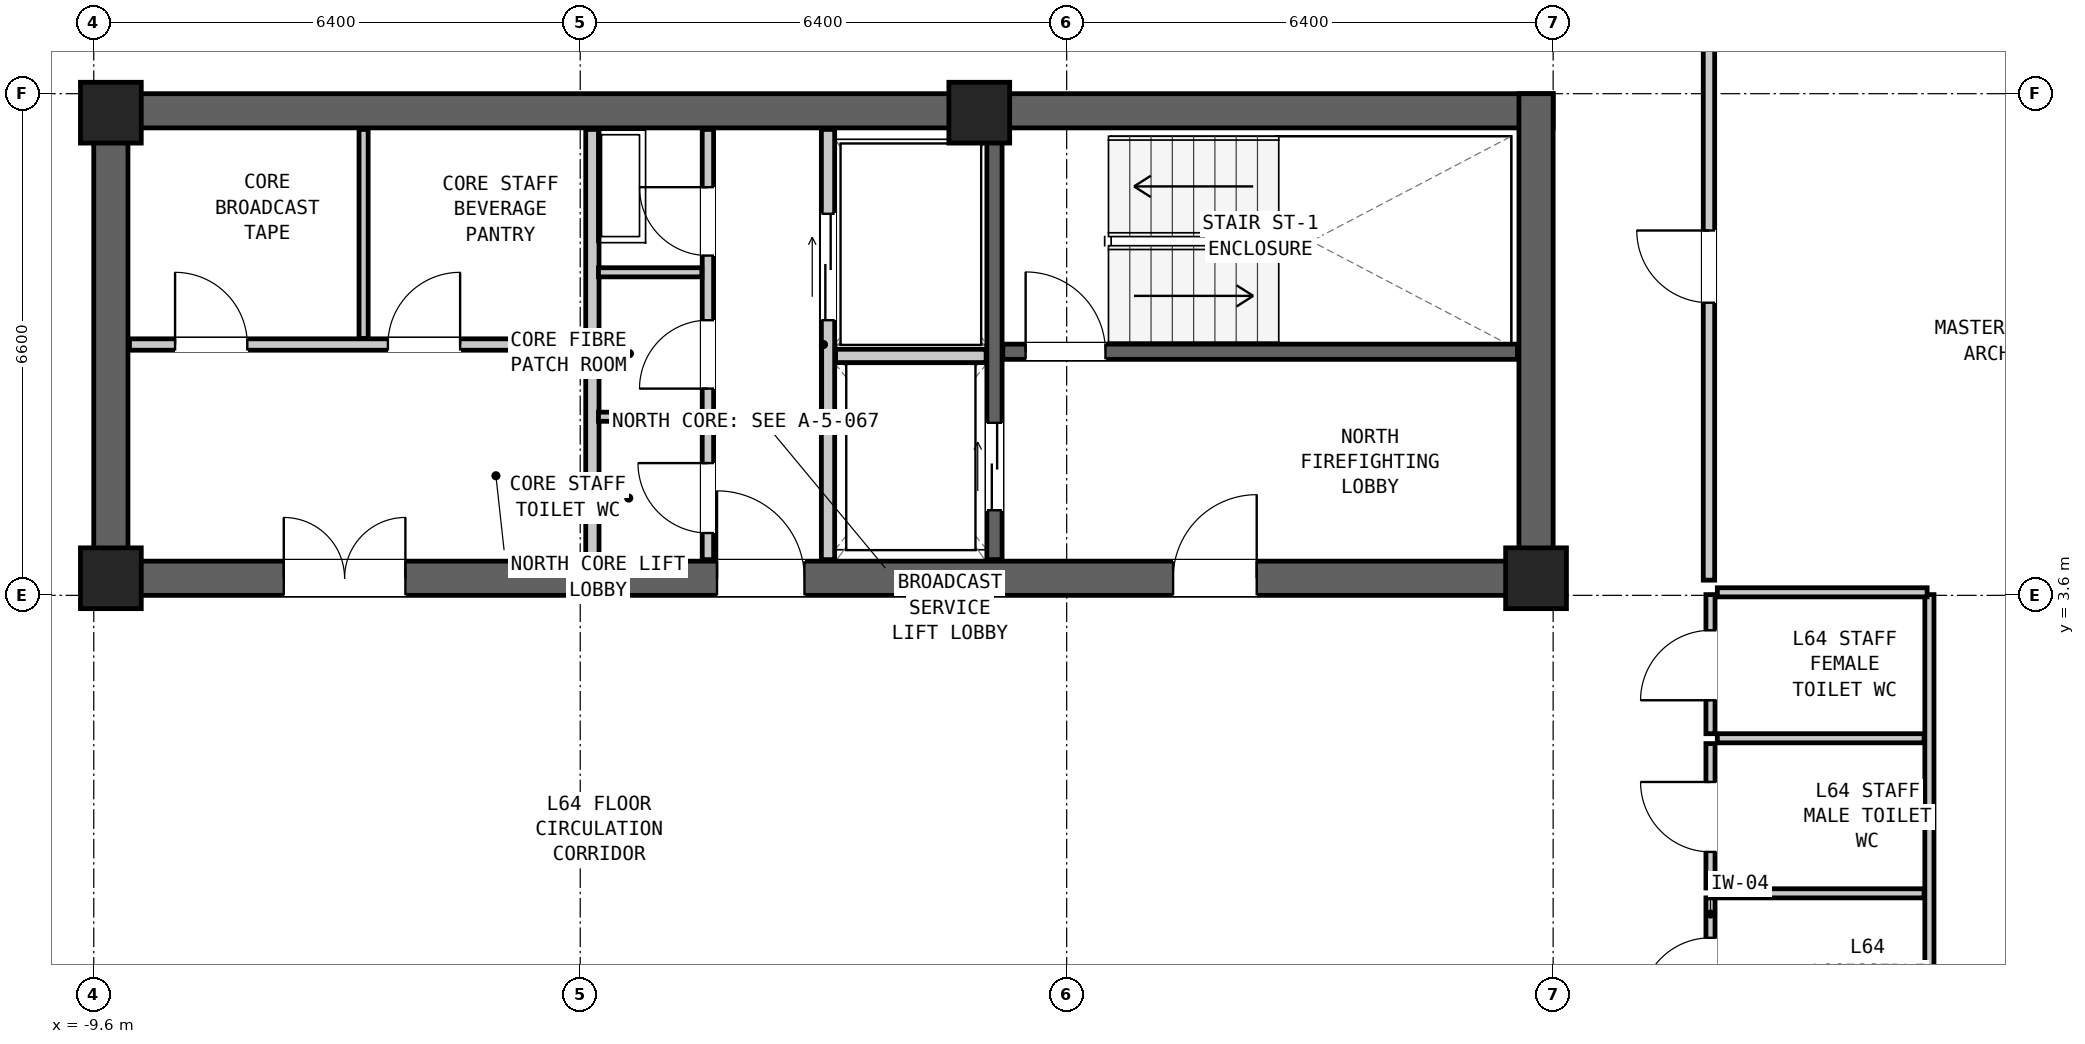
"""IFC4 building model, lengths in metres.
Left out: names, types, materials, properties, quantities, classifications, styles, units other than length and angle.
Written with IfcOpenShell. Run it as: python <this file> out.ifc"""

import sys

from ifc_helpers import new_model, si_unit, direction, frame, frame_2d, origin, origin_2d, place, context, subcontext, project, spatial, rectangle, extrude, element, fill, save


model = new_model("IFC4")
c1 = context("Model", 3, precision=1e-05, world=origin(), true_north=direction((0.0, 1.0)))
c2 = subcontext(c1, "Body", "Model", "MODEL_VIEW")
j1 = project(units=[si_unit("LENGTHUNIT", "METRE"), si_unit("PLANEANGLEUNIT", "RADIAN")], contexts=[c1])
p1 = place(None, origin())
s1 = spatial("IfcSite", under=j1, at=p1, CompositionType="ELEMENT")
p2 = place(p1, origin())
s2 = spatial("IfcBuilding", under=s1, at=p2, CompositionType="ELEMENT")
p3 = place(p2, frame((0.0, 0.0, 217.8)))
s3 = spatial("IfcBuildingStorey", under=s2, at=p3, CompositionType="ELEMENT", Elevation=217.8)
p4 = place(p3, frame((-9.6, 9.975, 0.0), z_axis=(0.0, 0.0, 1.0), x_axis=(1.0, 0.0, 0.0)))
e1 = element("IfcWall", 1, at=p4, inside=s3, PredefinedType="SHEAR", context=c2, shape_type="SweptSolid", body=[
    extrude(rectangle(XDim=19.2, YDim=0.45, at=frame_2d((9.6, 0.0))), origin(), (0.0, 0.0, 1.0), 3.05),
])
p5 = place(p3, frame((-9.6, 3.825, 0.0), z_axis=(0.0, 0.0, 1.0), x_axis=(1.0, 0.0, 0.0)))
e2 = element("IfcWall", 2, at=p5, inside=s3, PredefinedType="SHEAR", context=c2, shape_type="SweptSolid", body=[
    extrude(rectangle(XDim=19.2, YDim=0.45, at=frame_2d((9.6, 0.0))), origin(), (0.0, 0.0, 1.0), 3.05),
])
p6 = place(p5, frame((14.2, 0.0, 0.0)))
e3 = element("IfcOpeningElement", 3, at=p6, cuts=e2, PredefinedType="OPENING", context=c2, shape_type="SweptSolid", body=[
    extrude(rectangle(XDim=1.1, YDim=2.08, at=frame_2d((0.55, 1.04))), frame((0.0, 0.237, 0.0), z_axis=(0.0, -1.0, 0.0), x_axis=(1.0, 0.0, 0.0)), (0.0, 0.0, 1.0), 0.474),
])
p7 = place(p5, frame((8.2, 0.0, 0.0)))
e4 = element("IfcOpeningElement", 4, at=p7, cuts=e2, PredefinedType="OPENING", context=c2, shape_type="SweptSolid", body=[
    extrude(rectangle(XDim=1.15, YDim=2.1, at=frame_2d((0.575, 1.05))), frame((0.0, 0.237, 0.0), z_axis=(0.0, -1.0, 0.0), x_axis=(1.0, 0.0, 0.0)), (0.0, 0.0, 1.0), 0.474),
])
p8 = place(p5, frame((2.5, 0.0, 0.0)))
e5 = element("IfcOpeningElement", 5, at=p8, cuts=e2, PredefinedType="OPENING", context=c2, shape_type="SweptSolid", body=[
    extrude(rectangle(XDim=1.6, YDim=2.12, at=frame_2d((0.8, 1.06))), frame((0.0, 0.237, 0.0), z_axis=(0.0, -1.0, 0.0), x_axis=(1.0, 0.0, 0.0)), (0.0, 0.0, 1.0), 0.474),
])
for number, where, z_axis, x_axis in (
    (6, (-9.375, 3.6, 0.0), (0.0, 0.0, 1.0), (0.0, 1.0, 0.0)),
    (7, (9.375, 3.6, 0.0), (0.0, 0.0, 1.0), (0.0, 1.0, 0.0)),
):
    element("IfcWall", number, at=place(p3, frame(where, z_axis=z_axis, x_axis=x_axis)), inside=s3, PredefinedType="SHEAR", context=c2, shape_type="SweptSolid", body=[
        extrude(rectangle(XDim=6.6, YDim=0.45, at=frame_2d((3.3, 0.0))), origin(), (0.0, 0.0, 1.0), 3.05),
    ])
for number, where, z_axis, x_axis in (
    (8, (-9.375, 9.95, 0.0), (0.0, 0.0, 1.0), (1.0, 0.0, 0.0)),
    (9, (2.05, 9.95, 0.0), (0.0, 0.0, 1.0), (1.0, 0.0, 0.0)),
    (10, (-9.375, 3.825, 0.0), (0.0, 0.0, 1.0), (1.0, 0.0, 0.0)),
    (11, (9.375, 3.825, 0.0), (0.0, 0.0, 1.0), (1.0, 0.0, 0.0)),
):
    element("IfcColumn", number, at=place(p3, frame(where, z_axis=z_axis, x_axis=x_axis)), inside=s3, PredefinedType="COLUMN", context=c2, shape_type="SweptSolid", body=[
        extrude(rectangle(XDim=0.8, YDim=0.8, at=origin_2d()), origin(), (0.0, 0.0, 1.0), 3.05),
    ])
p9 = place(p3, frame((2.36, 6.805, 0.0), z_axis=(0.0, 0.0, 1.0), x_axis=(1.0, 0.0, 0.0)))
e12 = element("IfcWall", 12, at=p9, inside=s3, PredefinedType="SHEAR", context=c2, shape_type="SweptSolid", body=[
    extrude(rectangle(XDim=6.77, YDim=0.2, at=frame_2d((3.385, 0.0))), origin(), (0.0, 0.0, 1.0), 2.86),
])
p10 = place(p9, frame((0.3, 0.0, 0.0)))
e13 = element("IfcOpeningElement", 13, at=p10, cuts=e12, PredefinedType="OPENING", context=c2, shape_type="SweptSolid", body=[
    extrude(rectangle(XDim=1.05, YDim=2.08, at=frame_2d((0.525, 1.04))), frame((0.0, 0.112, 0.0), z_axis=(0.0, -1.0, 0.0), x_axis=(1.0, 0.0, 0.0)), (0.0, 0.0, 1.0), 0.224),
])
p11 = place(p3, frame((2.25, 4.07, 0.0), z_axis=(0.0, 0.0, 1.0), x_axis=(0.0, 1.0, 0.0)))
e14 = element("IfcWall", 14, at=p11, inside=s3, PredefinedType="SHEAR", context=c2, shape_type="SweptSolid", body=[
    extrude(rectangle(XDim=5.66, YDim=0.2, at=frame_2d((2.83, 0.0))), origin(), (0.0, 0.0, 1.0), 2.86),
])
p12 = place(p11, frame((0.65, 0.0, 0.0)))
e15 = element("IfcOpeningElement", 15, at=p12, cuts=e14, PredefinedType="OPENING", context=c2, shape_type="SweptSolid", body=[
    extrude(rectangle(XDim=1.15, YDim=2.08, at=frame_2d((0.575, 1.04))), frame((0.0, 0.112, 0.0), z_axis=(0.0, -1.0, 0.0), x_axis=(1.0, 0.0, 0.0)), (0.0, 0.0, 1.0), 0.224),
])
p13 = place(p3, frame((0.06, 4.07, 0.0), z_axis=(0.0, 0.0, 1.0), x_axis=(0.0, 1.0, 0.0)))
e16 = element("IfcWall", 16, at=p13, inside=s3, PredefinedType="PARTITIONING", context=c2, shape_type="SweptSolid", body=[
    extrude(rectangle(XDim=5.66, YDim=0.175, at=frame_2d((2.83, 0.0))), origin(), (0.0, 0.0, 1.0), 2.86),
])
p14 = place(p13, frame((3.15, 0.0, 0.0)))
e17 = element("IfcOpeningElement", 17, at=p14, cuts=e16, PredefinedType="OPENING", context=c2, shape_type="SweptSolid", body=[
    extrude(rectangle(XDim=1.4, YDim=2.12, at=frame_2d((0.7, 1.06))), frame((0.0, 0.1, 0.0), z_axis=(0.0, -1.0, 0.0), x_axis=(1.0, 0.0, 0.0)), (0.0, 0.0, 1.0), 0.199),
])
p15 = place(p3, frame((0.16, 6.75, 0.0), z_axis=(0.0, 0.0, 1.0), x_axis=(1.0, 0.0, 0.0)))
e18 = element("IfcWall", 18, at=p15, inside=s3, PredefinedType="PARTITIONING", context=c2, shape_type="SweptSolid", body=[
    extrude(rectangle(XDim=1.98, YDim=0.175, at=frame_2d((0.99, 0.0))), origin(), (0.0, 0.0, 1.0), 2.86),
])
p16 = place(p3, frame((-3.04, 4.07, 0.0), z_axis=(0.0, 0.0, 1.0), x_axis=(0.0, 1.0, 0.0)))
e19 = element("IfcWall", 19, at=p16, inside=s3, PredefinedType="PARTITIONING", context=c2, shape_type="SweptSolid", body=[
    extrude(rectangle(XDim=5.66, YDim=0.175, at=frame_2d((2.83, 0.0))), origin(), (0.0, 0.0, 1.0), 2.86),
])
p17 = place(p3, frame((-1.52, 4.07, 0.0), z_axis=(0.0, 0.0, 1.0), x_axis=(0.0, 1.0, 0.0)))
e20 = element("IfcWall", 20, at=p17, inside=s3, PredefinedType="PARTITIONING", context=c2, shape_type="SweptSolid", body=[
    extrude(rectangle(XDim=5.66, YDim=0.15, at=frame_2d((2.83, 0.0))), origin(), (0.0, 0.0, 1.0), 2.86),
])
p18 = place(p17, frame((4.0, 0.0, 0.0)))
e21 = element("IfcOpeningElement", 21, at=p18, cuts=e20, PredefinedType="OPENING", context=c2, shape_type="SweptSolid", body=[
    extrude(rectangle(XDim=0.9, YDim=2.05, at=frame_2d((0.45, 1.025))), frame((0.0, 0.087, 0.0), z_axis=(0.0, -1.0, 0.0), x_axis=(1.0, 0.0, 0.0)), (0.0, 0.0, 1.0), 0.174),
])
p19 = place(p17, frame((2.25, 0.0, 0.0)))
e22 = element("IfcOpeningElement", 22, at=p19, cuts=e20, PredefinedType="OPENING", context=c2, shape_type="SweptSolid", body=[
    extrude(rectangle(XDim=0.9, YDim=2.05, at=frame_2d((0.45, 1.025))), frame((0.0, 0.087, 0.0), z_axis=(0.0, -1.0, 0.0), x_axis=(1.0, 0.0, 0.0)), (0.0, 0.0, 1.0), 0.174),
])
p20 = place(p17, frame((0.35, 0.0, 0.0)))
e23 = element("IfcOpeningElement", 23, at=p20, cuts=e20, PredefinedType="OPENING", context=c2, shape_type="SweptSolid", body=[
    extrude(rectangle(XDim=0.92, YDim=2.1, at=frame_2d((0.46, 1.05))), frame((0.0, 0.087, 0.0), z_axis=(0.0, -1.0, 0.0), x_axis=(1.0, 0.0, 0.0)), (0.0, 0.0, 1.0), 0.174),
])
for number, where, z_axis, x_axis in (
    (24, (-2.96, 5.95, 0.0), (0.0, 0.0, 1.0), (1.0, 0.0, 0.0)),
    (25, (-2.96, 7.85, 0.0), (0.0, 0.0, 1.0), (1.0, 0.0, 0.0)),
):
    element("IfcWall", number, at=place(p3, frame(where, z_axis=z_axis, x_axis=x_axis)), inside=s3, PredefinedType="PARTITIONING", context=c2, shape_type="SweptSolid", body=[
        extrude(rectangle(XDim=1.36, YDim=0.12, at=frame_2d((0.68, 0.0))), origin(), (0.0, 0.0, 1.0), 2.86),
    ])
p21 = place(p3, frame((-9.13, 6.9, 0.0), z_axis=(0.0, 0.0, 1.0), x_axis=(1.0, 0.0, 0.0)))
e26 = element("IfcWall", 26, at=p21, inside=s3, PredefinedType="PARTITIONING", context=c2, shape_type="SweptSolid", body=[
    extrude(rectangle(XDim=6.01, YDim=0.15, at=frame_2d((3.005, 0.0))), origin(), (0.0, 0.0, 1.0), 2.86),
])
p22 = place(p21, frame((0.6, 0.0, 0.0)))
e27 = element("IfcOpeningElement", 27, at=p22, cuts=e26, PredefinedType="OPENING", context=c2, shape_type="SweptSolid", body=[
    extrude(rectangle(XDim=0.95, YDim=2.1, at=frame_2d((0.475, 1.05))), frame((0.0, 0.087, 0.0), z_axis=(0.0, -1.0, 0.0), x_axis=(1.0, 0.0, 0.0)), (0.0, 0.0, 1.0), 0.174),
])
p23 = place(p21, frame((3.4, 0.0, 0.0)))
e28 = element("IfcOpeningElement", 28, at=p23, cuts=e26, PredefinedType="OPENING", context=c2, shape_type="SweptSolid", body=[
    extrude(rectangle(XDim=0.95, YDim=2.1, at=frame_2d((0.475, 1.05))), frame((0.0, 0.087, 0.0), z_axis=(0.0, -1.0, 0.0), x_axis=(1.0, 0.0, 0.0)), (0.0, 0.0, 1.0), 0.174),
])
p24 = place(p3, frame((-6.05, 6.98, 0.0), z_axis=(0.0, 0.0, 1.0), x_axis=(0.0, 1.0, 0.0)))
e29 = element("IfcWall", 29, at=p24, inside=s3, PredefinedType="PARTITIONING", context=c2, shape_type="SweptSolid", body=[
    extrude(rectangle(XDim=2.75, YDim=0.12, at=frame_2d((1.375, 0.0))), origin(), (0.0, 0.0, 1.0), 2.86),
])
p25 = place(p3, frame((11.67, -2.32, 0.0), z_axis=(0.0, 0.0, 1.0), x_axis=(0.0, 1.0, 0.0)))
e30 = element("IfcWall", 30, at=p25, inside=s3, PredefinedType="PARTITIONING", context=c2, shape_type="SweptSolid", body=[
    extrude(rectangle(XDim=1.94, YDim=0.12, at=frame_2d((0.97, 0.0))), origin(), (0.0, 0.0, 1.0), 2.86),
])
p26 = place(p25, frame((0.495, 0.0, 0.0)))
e31 = element("IfcOpeningElement", 31, at=p26, cuts=e30, PredefinedType="OPENING", context=c2, shape_type="SweptSolid", body=[
    extrude(rectangle(XDim=0.92, YDim=2.1, at=frame_2d((0.46, 1.05))), frame((0.0, 0.072, 0.0), z_axis=(0.0, -1.0, 0.0), x_axis=(1.0, 0.0, 0.0)), (0.0, 0.0, 1.0), 0.144),
])
p27 = place(p3, frame((11.67, -0.25, 0.0), z_axis=(0.0, 0.0, 1.0), x_axis=(0.0, 1.0, 0.0)))
e32 = element("IfcWall", 32, at=p27, inside=s3, PredefinedType="PARTITIONING", context=c2, shape_type="SweptSolid", body=[
    extrude(rectangle(XDim=1.9, YDim=0.12, at=frame_2d((0.95, 0.0))), origin(), (0.0, 0.0, 1.0), 2.86),
])
p28 = place(p27, frame((0.475, 0.0, 0.0)))
e33 = element("IfcOpeningElement", 33, at=p28, cuts=e32, PredefinedType="OPENING", context=c2, shape_type="SweptSolid", body=[
    extrude(rectangle(XDim=0.92, YDim=2.1, at=frame_2d((0.46, 1.05))), frame((0.0, 0.072, 0.0), z_axis=(0.0, -1.0, 0.0), x_axis=(1.0, 0.0, 0.0)), (0.0, 0.0, 1.0), 0.144),
])
p29 = place(p3, frame((11.67, 1.78, 0.0), z_axis=(0.0, 0.0, 1.0), x_axis=(0.0, 1.0, 0.0)))
e34 = element("IfcWall", 34, at=p29, inside=s3, PredefinedType="PARTITIONING", context=c2, shape_type="SweptSolid", body=[
    extrude(rectangle(XDim=1.83, YDim=0.12, at=frame_2d((0.915, 0.0))), origin(), (0.0, 0.0, 1.0), 2.86),
])
p30 = place(p29, frame((0.44, 0.0, 0.0)))
e35 = element("IfcOpeningElement", 35, at=p30, cuts=e34, PredefinedType="OPENING", context=c2, shape_type="SweptSolid", body=[
    extrude(rectangle(XDim=0.92, YDim=2.1, at=frame_2d((0.46, 1.05))), frame((0.0, 0.072, 0.0), z_axis=(0.0, -1.0, 0.0), x_axis=(1.0, 0.0, 0.0)), (0.0, 0.0, 1.0), 0.144),
])
p31 = place(p3, frame((14.55, -2.32, 0.0), z_axis=(0.0, 0.0, 1.0), x_axis=(0.0, 1.0, 0.0)))
e36 = element("IfcWall", 36, at=p31, inside=s3, PredefinedType="PARTITIONING", context=c2, shape_type="SweptSolid", body=[
    extrude(rectangle(XDim=5.93, YDim=0.12, at=frame_2d((2.965, 0.0))), origin(), (0.0, 0.0, 1.0), 2.86),
])
p32 = place(p3, frame((11.76, 3.64, 0.0), z_axis=(0.0, 0.0, 1.0), x_axis=(1.0, 0.0, 0.0)))
e37 = element("IfcWall", 37, at=p32, inside=s3, PredefinedType="PARTITIONING", context=c2, shape_type="SweptSolid", body=[
    extrude(rectangle(XDim=2.76, YDim=0.12, at=frame_2d((1.38, 0.0))), origin(), (0.0, 0.0, 1.0), 1.981),
])
for number, where, z_axis, x_axis in (
    (38, (11.76, -0.32, 0.0), (0.0, 0.0, 1.0), (1.0, 0.0, 0.0)),
    (39, (11.76, 1.72, 0.0), (0.0, 0.0, 1.0), (1.0, 0.0, 0.0)),
):
    element("IfcWall", number, at=place(p3, frame(where, z_axis=z_axis, x_axis=x_axis)), inside=s3, PredefinedType="PARTITIONING", context=c2, shape_type="SweptSolid", body=[
        extrude(rectangle(XDim=2.72, YDim=0.12, at=frame_2d((1.36, 0.0))), origin(), (0.0, 0.0, 1.0), 2.86),
    ])
p33 = place(p3, frame((11.65, 3.8, 0.0), z_axis=(0.0, 0.0, 1.0), x_axis=(0.0, 1.0, 0.0)))
e40 = element("IfcWall", 40, at=p33, inside=s3, PredefinedType="PARTITIONING", context=c2, shape_type="SweptSolid", body=[
    extrude(rectangle(XDim=8.25, YDim=0.15, at=frame_2d((4.125, 0.0))), origin(), (0.0, 0.0, 1.0), 2.86),
])
p34 = place(p33, frame((3.65, 0.0, 0.0)))
e41 = element("IfcOpeningElement", 41, at=p34, cuts=e40, PredefinedType="OPENING", context=c2, shape_type="SweptSolid", body=[
    extrude(rectangle(XDim=0.95, YDim=2.1, at=frame_2d((0.475, 1.05))), frame((0.0, 0.087, 0.0), z_axis=(0.0, -1.0, 0.0), x_axis=(1.0, 0.0, 0.0)), (0.0, 0.0, 1.0), 0.174),
])
p35 = place(p10, origin())
e42 = element("IfcDoor", 42, at=p35, inside=s3, OperationType="SINGLE_SWING_LEFT", PredefinedType="DOOR", context=c2, shape_type="SweptSolid", body=[
    extrude(rectangle(XDim=1.05, YDim=2.08, at=frame_2d((0.525, 1.04))), frame((0.0, 0.025, 0.0), z_axis=(0.0, -1.0, 0.0), x_axis=(1.0, 0.0, 0.0)), (0.0, 0.0, 1.0), 0.05),
])
fill(e13, e42)
p36 = place(p6, origin())
e43 = element("IfcDoor", 43, at=p36, inside=s3, OperationType="SINGLE_SWING_RIGHT", PredefinedType="DOOR", context=c2, shape_type="SweptSolid", body=[
    extrude(rectangle(XDim=1.1, YDim=2.08, at=frame_2d((0.55, 1.04))), frame((0.0, 0.025, 0.0), z_axis=(0.0, -1.0, 0.0), x_axis=(1.0, 0.0, 0.0)), (0.0, 0.0, 1.0), 0.05),
])
fill(e3, e43)
p37 = place(p12, origin())
e44 = element("IfcDoor", 44, at=p37, inside=s3, OperationType="DOUBLE_DOOR_SLIDING", PredefinedType="DOOR", context=c2, shape_type="SweptSolid", body=[
    extrude(rectangle(XDim=1.15, YDim=2.08, at=frame_2d((0.575, 1.04))), frame((0.0, 0.025, 0.0), z_axis=(0.0, -1.0, 0.0), x_axis=(1.0, 0.0, 0.0)), (0.0, 0.0, 1.0), 0.05),
])
fill(e15, e44)
p38 = place(p14, origin())
e45 = element("IfcDoor", 45, at=p38, inside=s3, OperationType="DOUBLE_DOOR_SLIDING", PredefinedType="DOOR", context=c2, shape_type="SweptSolid", body=[
    extrude(rectangle(XDim=1.4, YDim=2.12, at=frame_2d((0.7, 1.06))), frame((0.0, 0.025, 0.0), z_axis=(0.0, -1.0, 0.0), x_axis=(1.0, 0.0, 0.0)), (0.0, 0.0, 1.0), 0.05),
])
fill(e17, e45)
p39 = place(p7, origin())
e46 = element("IfcDoor", 46, at=p39, inside=s3, OperationType="SINGLE_SWING_LEFT", PredefinedType="DOOR", context=c2, shape_type="SweptSolid", body=[
    extrude(rectangle(XDim=1.15, YDim=2.1, at=frame_2d((0.575, 1.05))), frame((0.0, 0.025, 0.0), z_axis=(0.0, -1.0, 0.0), x_axis=(1.0, 0.0, 0.0)), (0.0, 0.0, 1.0), 0.05),
])
fill(e4, e46)
p40 = place(p18, origin())
e47 = element("IfcDoor", 47, at=p40, inside=s3, OperationType="SINGLE_SWING_RIGHT", PredefinedType="DOOR", context=c2, shape_type="SweptSolid", body=[
    extrude(rectangle(XDim=0.9, YDim=2.05, at=frame_2d((0.45, 1.025))), frame((0.0, 0.025, 0.0), z_axis=(0.0, -1.0, 0.0), x_axis=(1.0, 0.0, 0.0)), (0.0, 0.0, 1.0), 0.05),
])
fill(e21, e47)
p41 = place(p19, origin())
e48 = element("IfcDoor", 48, at=p41, inside=s3, OperationType="SINGLE_SWING_LEFT", PredefinedType="DOOR", context=c2, shape_type="SweptSolid", body=[
    extrude(rectangle(XDim=0.9, YDim=2.05, at=frame_2d((0.45, 1.025))), frame((0.0, 0.025, 0.0), z_axis=(0.0, -1.0, 0.0), x_axis=(1.0, 0.0, 0.0)), (0.0, 0.0, 1.0), 0.05),
])
fill(e22, e48)
p42 = place(p20, origin())
e49 = element("IfcDoor", 49, at=p42, inside=s3, OperationType="SINGLE_SWING_RIGHT", PredefinedType="DOOR", context=c2, shape_type="SweptSolid", body=[
    extrude(rectangle(XDim=0.92, YDim=2.1, at=frame_2d((0.46, 1.05))), frame((0.0, 0.025, 0.0), z_axis=(0.0, -1.0, 0.0), x_axis=(1.0, 0.0, 0.0)), (0.0, 0.0, 1.0), 0.05),
])
fill(e23, e49)
p43 = place(p8, origin())
e50 = element("IfcDoor", 50, at=p43, inside=s3, OperationType="DOUBLE_DOOR_SINGLE_SWING", PredefinedType="DOOR", context=c2, shape_type="SweptSolid", body=[
    extrude(rectangle(XDim=1.6, YDim=2.12, at=frame_2d((0.8, 1.06))), frame((0.0, 0.025, 0.0), z_axis=(0.0, -1.0, 0.0), x_axis=(1.0, 0.0, 0.0)), (0.0, 0.0, 1.0), 0.05),
])
fill(e5, e50)
p44 = place(p22, origin())
e51 = element("IfcDoor", 51, at=p44, inside=s3, OperationType="SINGLE_SWING_LEFT", PredefinedType="DOOR", context=c2, shape_type="SweptSolid", body=[
    extrude(rectangle(XDim=0.95, YDim=2.1, at=frame_2d((0.475, 1.05))), frame((0.0, 0.025, 0.0), z_axis=(0.0, -1.0, 0.0), x_axis=(1.0, 0.0, 0.0)), (0.0, 0.0, 1.0), 0.05),
])
fill(e27, e51)
p45 = place(p23, origin())
e52 = element("IfcDoor", 52, at=p45, inside=s3, OperationType="SINGLE_SWING_RIGHT", PredefinedType="DOOR", context=c2, shape_type="SweptSolid", body=[
    extrude(rectangle(XDim=0.95, YDim=2.1, at=frame_2d((0.475, 1.05))), frame((0.0, 0.025, 0.0), z_axis=(0.0, -1.0, 0.0), x_axis=(1.0, 0.0, 0.0)), (0.0, 0.0, 1.0), 0.05),
])
fill(e28, e52)
p46 = place(p26, origin())
e53 = element("IfcDoor", 53, at=p46, inside=s3, OperationType="SINGLE_SWING_LEFT", PredefinedType="DOOR", context=c2, shape_type="SweptSolid", body=[
    extrude(rectangle(XDim=0.92, YDim=2.1, at=frame_2d((0.46, 1.05))), frame((0.0, 0.025, 0.0), z_axis=(0.0, -1.0, 0.0), x_axis=(1.0, 0.0, 0.0)), (0.0, 0.0, 1.0), 0.05),
])
fill(e31, e53)
p47 = place(p28, origin())
e54 = element("IfcDoor", 54, at=p47, inside=s3, OperationType="SINGLE_SWING_RIGHT", PredefinedType="DOOR", context=c2, shape_type="SweptSolid", body=[
    extrude(rectangle(XDim=0.92, YDim=2.1, at=frame_2d((0.46, 1.05))), frame((0.0, 0.025, 0.0), z_axis=(0.0, -1.0, 0.0), x_axis=(1.0, 0.0, 0.0)), (0.0, 0.0, 1.0), 0.05),
])
fill(e33, e54)
p48 = place(p30, origin())
e55 = element("IfcDoor", 55, at=p48, inside=s3, OperationType="SINGLE_SWING_LEFT", PredefinedType="DOOR", context=c2, shape_type="SweptSolid", body=[
    extrude(rectangle(XDim=0.92, YDim=2.1, at=frame_2d((0.46, 1.05))), frame((0.0, 0.025, 0.0), z_axis=(0.0, -1.0, 0.0), x_axis=(1.0, 0.0, 0.0)), (0.0, 0.0, 1.0), 0.05),
])
fill(e35, e55)
p49 = place(p34, origin())
e56 = element("IfcDoor", 56, at=p49, inside=s3, OperationType="SINGLE_SWING_RIGHT", PredefinedType="DOOR", context=c2, shape_type="SweptSolid", body=[
    extrude(rectangle(XDim=0.95, YDim=2.1, at=frame_2d((0.475, 1.05))), frame((0.0, 0.025, 0.0), z_axis=(0.0, -1.0, 0.0), x_axis=(1.0, 0.0, 0.0)), (0.0, 0.0, 1.0), 0.05),
])
fill(e41, e56)
save(model, sys.argv[1])
